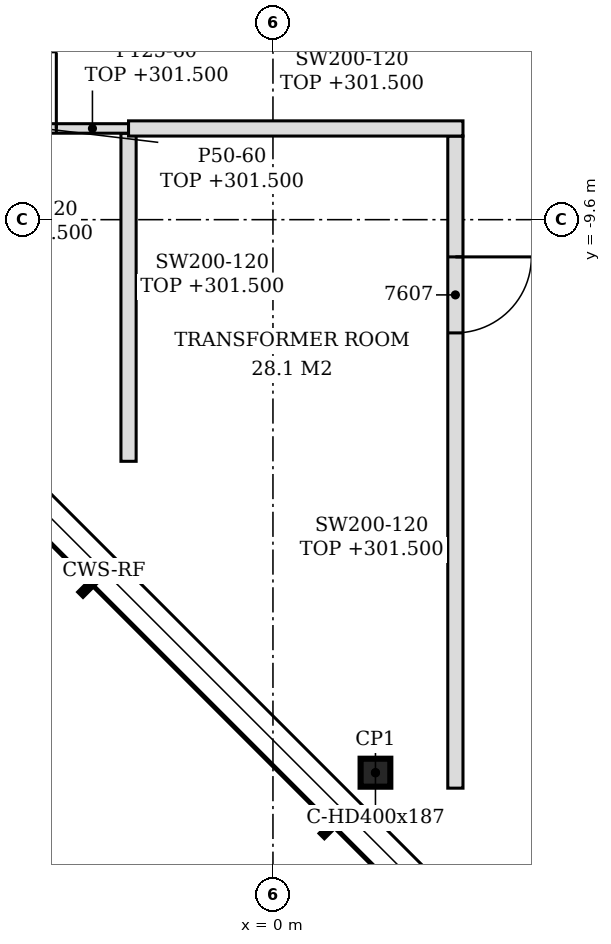
"""IFC4 building model, lengths in metres.
Left out: names, types, materials, properties, quantities, classifications, styles, units other than length and angle.
Written with IfcOpenShell. Run it as: python <this file> out.ifc"""

import sys

from ifc_helpers import new_model, si_unit, direction, frame, frame_2d, origin, origin_2d, place, context, subcontext, project, spatial, rectangle, hollow_rectangle, i_section, extrude, element, fill, save


model = new_model("IFC4")
c1 = context("Model", 3, precision=1e-05, world=origin(), true_north=direction((0.0, 1.0)))
c2 = subcontext(c1, "Body", "Model", "MODEL_VIEW")
j1 = project(units=[si_unit("LENGTHUNIT", "METRE"), si_unit("PLANEANGLEUNIT", "RADIAN")], contexts=[c1])
p1 = place(None, origin())
s1 = spatial("IfcSite", under=j1, at=p1, CompositionType="ELEMENT")
p2 = place(p1, origin())
s2 = spatial("IfcBuilding", under=s1, at=p2, CompositionType="ELEMENT")
p3 = place(p2, frame((0.0, 0.0, 295.8)))
s3 = spatial("IfcBuildingStorey", under=s2, at=p3, CompositionType="ELEMENT", Elevation=295.8)
p4 = place(p3, frame((1.348, -16.876, 5.7), z_axis=(0.0, 0.0, 1.0), x_axis=(1.0, 0.0, 0.0)))
e1 = element("IfcColumn", 1, at=p4, inside=s3, PredefinedType="COLUMN", context=c2, shape_type="SweptSolid", body=[
    extrude(hollow_rectangle(XDim=0.3, YDim=0.3, WallThickness=0.016, InnerFilletRadius=0.016, OuterFilletRadius=0.024, at=origin_2d()), origin(), (0.0, 0.0, 1.0), 4.309),
])
p5 = place(p3, frame((1.348, -16.876, -0.2), z_axis=(0.0, 0.0, 1.0), x_axis=(1.0, 0.0, 0.0)))
e2 = element("IfcColumn", 2, at=p5, inside=s3, PredefinedType="COLUMN", context=c2, shape_type="SweptSolid", body=[
    extrude(i_section(OverallWidth=0.391, OverallDepth=0.368, WebThickness=0.015, FlangeThickness=0.024, FilletRadius=0.015, at=origin_2d()), origin(), (0.0, 0.0, 1.0), 5.9),
])
p6 = place(p3, frame((2.4, -17.079, 0.0), z_axis=(0.0, 0.0, 1.0), x_axis=(0.0, 1.0, 0.0)))
e3 = element("IfcWall", 3, at=p6, inside=s3, PredefinedType="PARTITIONING", context=c2, shape_type="SweptSolid", body=[
    extrude(rectangle(XDim=8.579, YDim=0.2, at=frame_2d((4.29, 0.0))), origin(), (0.0, 0.0, 1.0), 5.7),
])
p7 = place(p6, frame((5.989, 0.0, 0.0)))
e4 = element("IfcOpeningElement", 4, at=p7, cuts=e3, PredefinedType="OPENING", context=c2, shape_type="SweptSolid", body=[
    extrude(rectangle(XDim=1.0, YDim=2.1, at=frame_2d((0.5, 1.05))), frame((0.0, 0.11, 0.0), z_axis=(0.0, -1.0, 0.0), x_axis=(1.0, 0.0, 0.0)), (0.0, 0.0, 1.0), 0.22),
])
p8 = place(p3, frame((-1.9, -12.779, 0.0), z_axis=(0.0, 0.0, 1.0), x_axis=(0.0, 1.0, 0.0)))
e5 = element("IfcWall", 5, at=p8, inside=s3, PredefinedType="PARTITIONING", context=c2, shape_type="SweptSolid", body=[
    extrude(rectangle(XDim=4.317, YDim=0.2, at=frame_2d((2.158, 0.0))), origin(), (0.0, 0.0, 1.0), 5.7),
])
p9 = place(p3, frame((-4.603, -8.4, 0.0), z_axis=(0.0, 0.0, 1.0), x_axis=(1.0, 0.0, 0.0)))
e6 = element("IfcWall", 6, at=p9, inside=s3, PredefinedType="PARTITIONING", context=c2, shape_type="SweptSolid", body=[
    extrude(rectangle(XDim=2.703, YDim=0.125, at=frame_2d((1.352, 0.0))), origin(), (0.0, 0.0, 1.0), 5.7),
])
p10 = place(p9, frame((0.753, 0.0, 0.0)))
e7 = element("IfcOpeningElement", 7, at=p10, cuts=e6, PredefinedType="OPENING", context=c2, shape_type="SweptSolid", body=[
    extrude(rectangle(XDim=1.0, YDim=2.1, at=frame_2d((0.5, 1.05))), frame((0.0, 0.073, 0.0), z_axis=(0.0, -1.0, 0.0), x_axis=(1.0, 0.0, 0.0)), (0.0, 0.0, 1.0), 0.145),
])
p11 = place(p3, frame((-1.9, -8.4, 0.0), z_axis=(0.0, 0.0, 1.0), x_axis=(1.0, 0.0, 0.0)))
e8 = element("IfcWall", 8, at=p11, inside=s3, PredefinedType="PARTITIONING", context=c2, shape_type="SweptSolid", body=[
    extrude(rectangle(XDim=4.4, YDim=0.2, at=frame_2d((2.2, 0.0))), origin(), (0.0, 0.0, 1.0), 5.7),
])
p12 = place(p10, origin())
e9 = element("IfcDoor", 9, at=p12, inside=s3, OperationType="SINGLE_SWING_RIGHT", PredefinedType="DOOR", context=c2, shape_type="SweptSolid", body=[
    extrude(rectangle(XDim=1.0, YDim=2.1, at=frame_2d((0.5, 1.05))), frame((0.0, 0.025, 0.0), z_axis=(0.0, -1.0, 0.0), x_axis=(1.0, 0.0, 0.0)), (0.0, 0.0, 1.0), 0.05),
])
fill(e7, e9)
p13 = place(p7, frame((1.0, 0.0, 0.0), z_axis=(0.0, 0.0, 1.0), x_axis=(-1.0, 0.0, 0.0)))
e10 = element("IfcDoor", 10, at=p13, inside=s3, OperationType="SINGLE_SWING_LEFT", PredefinedType="DOOR", context=c2, shape_type="SweptSolid", body=[
    extrude(rectangle(XDim=1.0, YDim=2.1, at=frame_2d((0.5, 1.05))), frame((0.0, 0.025, 0.0), z_axis=(0.0, -1.0, 0.0), x_axis=(1.0, 0.0, 0.0)), (0.0, 0.0, 1.0), 0.05),
])
fill(e4, e10)
save(model, sys.argv[1])
